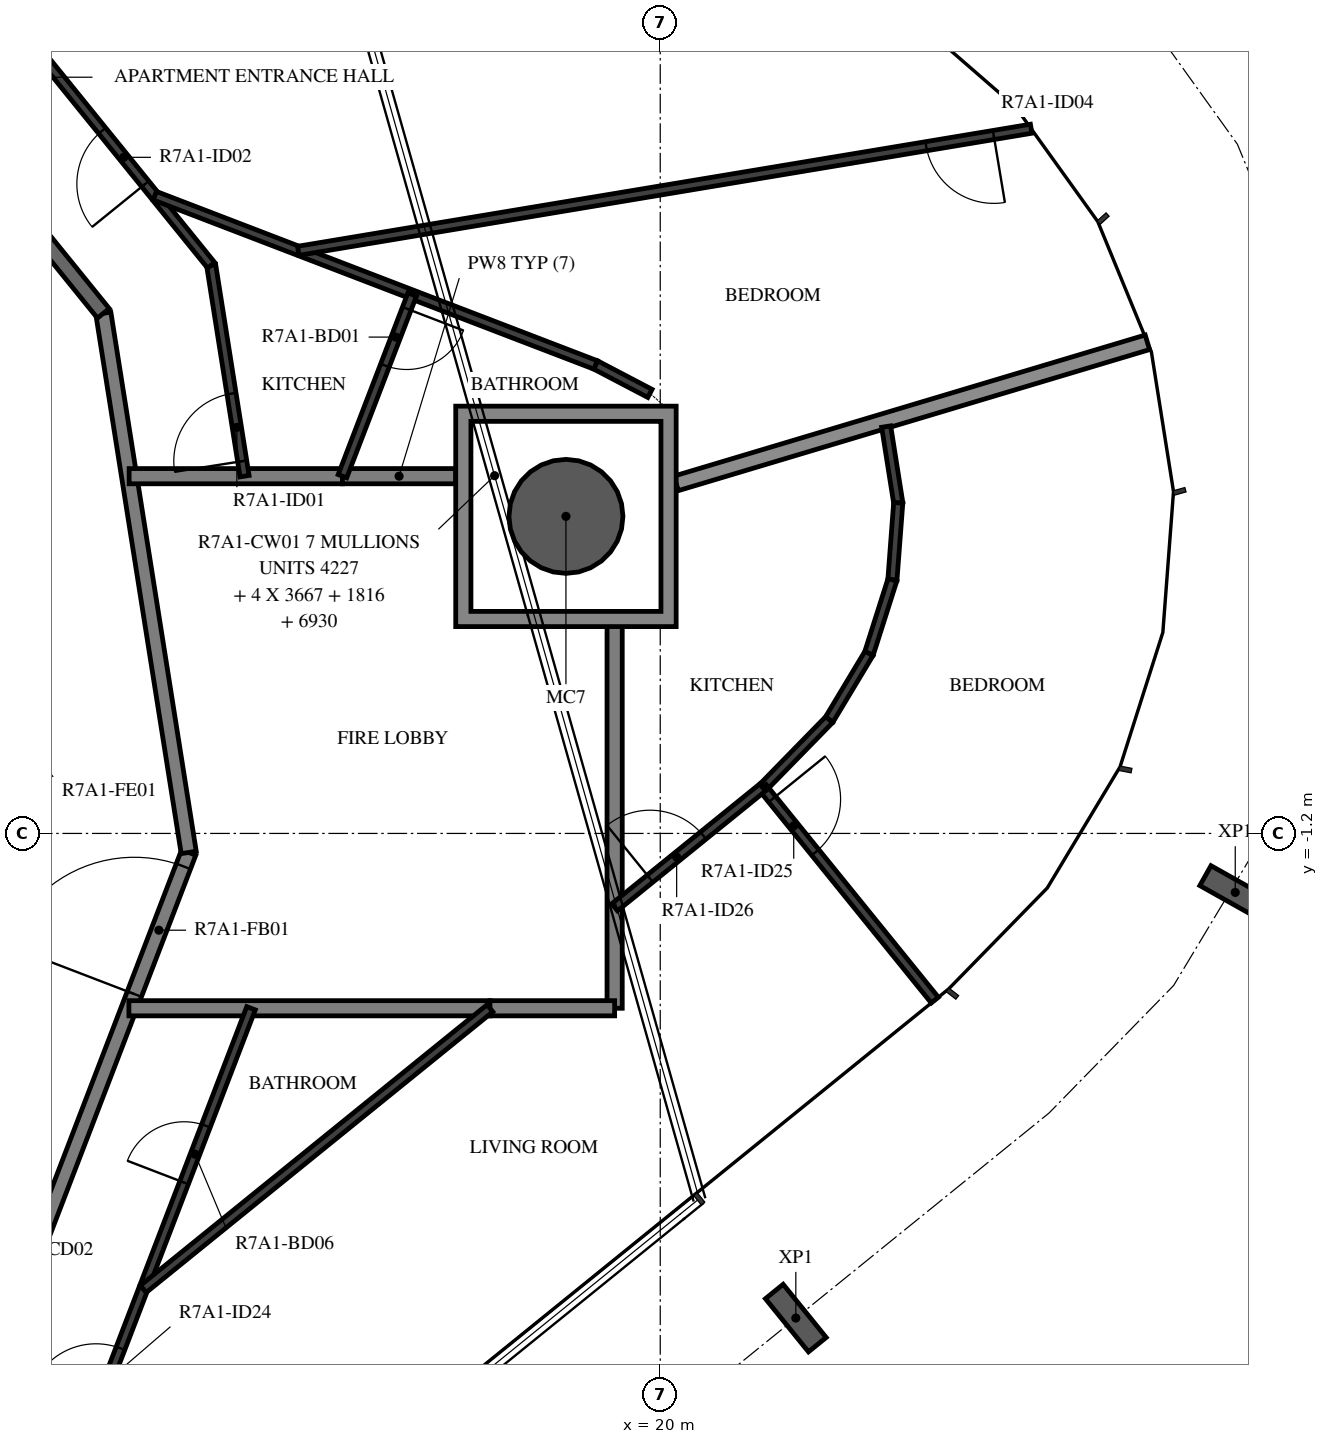
"""IFC4 building model, lengths in metres.
Left out: names, types, materials, properties, quantities, classifications, styles, units other than length and angle.
Written with IfcOpenShell. Run it as: python <this file> out.ifc"""

import sys

from ifc_helpers import new_model, si_unit, direction, frame, frame_2d, origin, origin_2d, place, context, subcontext, project, spatial, polyline, rectangle, hollow_circle, i_section, outline, extrude, element, fill, save


model = new_model("IFC4")
c1 = context("Model", 3, precision=1e-05, world=origin(), true_north=direction((0.0, 1.0)))
c2 = subcontext(c1, "Body", "Model", "MODEL_VIEW")
j1 = project(units=[si_unit("LENGTHUNIT", "METRE"), si_unit("PLANEANGLEUNIT", "RADIAN")], contexts=[c1])
p1 = place(None, origin())
s1 = spatial("IfcSite", under=j1, at=p1, CompositionType="ELEMENT")
p2 = place(p1, origin())
s2 = spatial("IfcBuilding", under=s1, at=p2, CompositionType="ELEMENT")
p3 = place(p2, frame((0.0, 0.0, 266.9)))
s3 = spatial("IfcBuildingStorey", under=s2, at=p3, CompositionType="ELEMENT", Elevation=266.9)
p4 = place(p3, frame((18.76, 2.971, -0.38), z_axis=(0.0, 0.0, 1.0), x_axis=(1.0, 0.0, 0.0)))
e1 = element("IfcColumn", 1, at=p4, inside=s3, PredefinedType="COLUMN", context=c2, shape_type="SweptSolid", body=[
    extrude(hollow_circle(Radius=0.75, WallThickness=0.035, at=origin_2d()), origin(), (0.0, 0.0, 1.0), 3.5),
])
for number, where, z_axis, x_axis in (
    (2, (21.784, -7.576, -0.38), (0.0, 0.0, 1.0), (-0.777, -0.629, 0.0)),
    (3, (27.565, -1.976, -0.38), (0.0, 0.0, 1.0), (-0.49, -0.872, 0.0)),
):
    element("IfcColumn", number, at=place(p3, frame(where, z_axis=z_axis, x_axis=x_axis)), inside=s3, PredefinedType="COLUMN", context=c2, shape_type="SweptSolid", body=[
        extrude(i_section(OverallWidth=0.3, OverallDepth=0.9, WebThickness=0.019, FlangeThickness=0.035, FilletRadius=0.03, at=origin_2d()), origin(), (0.0, 0.0, 1.0), 3.5),
    ])
p5 = place(p3, frame((11.223, -8.154, 0.0), z_axis=(0.0, 0.0, 1.0), x_axis=(0.358341090983, 0.93359073609, 0.0)))
e4 = element("IfcWall", 4, at=p5, inside=s3, PredefinedType="STANDARD", context=c2, shape_type="SweptSolid", body=[
    extrude(rectangle(XDim=7.181, YDim=0.2, at=frame_2d((3.59, 0.0))), origin(), (0.0, 0.0, 1.0), 3.12),
])
p6 = place(p5, frame((5.185, 0.0, 0.0)))
e5 = element("IfcOpeningElement", 5, at=p6, cuts=e4, PredefinedType="OPENING", context=c2, shape_type="SweptSolid", body=[
    extrude(rectangle(XDim=1.8, YDim=2.1, at=frame_2d((0.9, 1.05))), frame((0.0, 0.11, 0.0), z_axis=(0.0, -1.0, 0.0), x_axis=(1.0, 0.0, 0.0)), (0.0, 0.0, 1.0), 0.22),
])
p7 = place(p3, frame((13.797, -1.45, 0.0), z_axis=(0.0, 0.0, 1.0), x_axis=(-0.156421704315, 0.987690361611, 0.0)))
e6 = element("IfcWall", 6, at=p7, inside=s3, PredefinedType="STANDARD", context=c2, shape_type="SweptSolid", body=[
    extrude(rectangle(XDim=7.181, YDim=0.2, at=frame_2d((3.591, 0.0))), origin(), (0.0, 0.0, 1.0), 3.12),
])
p8 = place(p3, frame((12.673, 5.643, 0.0), z_axis=(0.0, 0.0, 1.0), x_axis=(-0.629302871585, 0.777160148113, 0.0)))
e7 = element("IfcWall", 7, at=p8, inside=s3, PredefinedType="STANDARD", context=c2, shape_type="SweptSolid", body=[
    extrude(rectangle(XDim=7.181, YDim=0.2, at=frame_2d((3.59, 0.0))), origin(), (0.0, 0.0, 1.0), 3.12),
])
p9 = place(p8, frame((4.1, 0.0, 0.0)))
e8 = element("IfcOpeningElement", 8, at=p9, cuts=e7, PredefinedType="OPENING", context=c2, shape_type="SweptSolid", body=[
    extrude(rectangle(XDim=1.0, YDim=2.1, at=frame_2d((0.5, 1.05))), frame((0.0, 0.11, 0.0), z_axis=(0.0, -1.0, 0.0), x_axis=(1.0, 0.0, 0.0)), (0.0, 0.0, 1.0), 0.22),
])
p10 = place(p3, frame((15.819, 3.5, 0.0), z_axis=(0.0, 0.0, 1.0), x_axis=(-1.0, 0.0, 0.0)))
e9 = element("IfcWall", 9, at=p10, inside=s3, PredefinedType="STANDARD", context=c2, shape_type="SweptSolid", body=[
    extrude(rectangle(XDim=2.806, YDim=0.2, at=frame_2d((1.403, 0.0))), origin(), (0.0, 0.0, 1.0), 3.12),
])
p11 = place(p3, frame((17.309, 3.5, 0.0), z_axis=(0.0, 0.0, 1.0), x_axis=(-1.0, 0.0, 0.0)))
e10 = element("IfcWall", 10, at=p11, inside=s3, PredefinedType="STANDARD", context=c2, shape_type="SweptSolid", body=[
    extrude(rectangle(XDim=1.49, YDim=0.2, at=frame_2d((0.745, 0.0))), origin(), (0.0, 0.0, 1.0), 3.12),
])
p12 = place(p3, frame((13.01, -3.5, 0.0), z_axis=(0.0, 0.0, 1.0), x_axis=(1.0, 0.0, 0.0)))
e11 = element("IfcWall", 11, at=p12, inside=s3, PredefinedType="STANDARD", context=c2, shape_type="SweptSolid", body=[
    extrude(rectangle(XDim=4.75, YDim=0.2, at=frame_2d((2.375, 0.0))), origin(), (0.0, 0.0, 1.0), 3.12),
])
p13 = place(p3, frame((19.4, -3.5, 0.0), z_axis=(0.0, 0.0, 1.0), x_axis=(0.0, 1.0, 0.0)))
e12 = element("IfcWall", 12, at=p13, inside=s3, PredefinedType="STANDARD", context=c2, shape_type="SweptSolid", body=[
    extrude(rectangle(XDim=5.021, YDim=0.2, at=frame_2d((2.511, 0.0))), origin(), (0.0, 0.0, 1.0), 3.12),
])
p14 = place(p3, frame((17.76, -3.5, 0.0), z_axis=(0.0, 0.0, 1.0), x_axis=(1.0, 0.0, 0.0)))
e13 = element("IfcWall", 13, at=p14, inside=s3, PredefinedType="STANDARD", context=c2, shape_type="SweptSolid", body=[
    extrude(rectangle(XDim=1.64, YDim=0.2, at=frame_2d((0.82, 0.0))), origin(), (0.0, 0.0, 1.0), 3.12),
])
p15 = place(p3, frame((20.209, 3.405, 0.0), z_axis=(0.0, 0.0, 1.0), x_axis=(0.957991224208, 0.286797514529, 0.0)))
e14 = element("IfcWall", 14, at=p15, inside=s3, PredefinedType="STANDARD", context=c2, shape_type="SweptSolid", body=[
    extrude(rectangle(XDim=6.471, YDim=0.2, at=frame_2d((3.236, 0.0))), origin(), (0.0, 0.0, 1.0), 2.73),
])
p16 = place(p3, frame((14.531, 3.5, 0.0), z_axis=(0.0, 0.0, 1.0), x_axis=(-0.1564580042, 0.987684612071, 0.0)))
e15 = element("IfcWall", 15, at=p16, inside=s3, PredefinedType="PARTITIONING", context=c2, shape_type="SweptSolid", body=[
    extrude(rectangle(XDim=2.809, YDim=0.12, at=frame_2d((1.404, 0.0))), origin(), (0.0, 0.0, 1.0), 3.12),
])
p17 = place(p16, frame((0.2, 0.0, 0.0)))
e16 = element("IfcOpeningElement", 16, at=p17, cuts=e15, PredefinedType="OPENING", context=c2, shape_type="SweptSolid", body=[
    extrude(rectangle(XDim=0.9, YDim=2.1, at=frame_2d((0.45, 1.05))), frame((0.0, 0.07, 0.0), z_axis=(0.0, -1.0, 0.0), x_axis=(1.0, 0.0, 0.0)), (0.0, 0.0, 1.0), 0.14),
])
p18 = place(p3, frame((14.092, 6.274, 0.0), z_axis=(0.0, 0.0, 1.0), x_axis=(-0.62933367237, 0.777135206268, 0.0)))
e17 = element("IfcWall", 17, at=p18, inside=s3, PredefinedType="PARTITIONING", context=c2, shape_type="SweptSolid", body=[
    extrude(rectangle(XDim=7.985, YDim=0.12, at=frame_2d((3.992, 0.0))), origin(), (0.0, 0.0, 1.0), 3.12),
])
p19 = place(p18, frame((1.378, 0.0, 0.0)))
e18 = element("IfcOpeningElement", 18, at=p19, cuts=e17, PredefinedType="OPENING", context=c2, shape_type="SweptSolid", body=[
    extrude(rectangle(XDim=0.9, YDim=2.1, at=frame_2d((0.45, 1.05))), frame((0.0, 0.07, 0.0), z_axis=(0.0, -1.0, 0.0), x_axis=(1.0, 0.0, 0.0)), (0.0, 0.0, 1.0), 0.14),
])
p20 = place(p18, frame((4.749, 0.0, 0.0)))
e19 = element("IfcOpeningElement", 19, at=p20, cuts=e17, PredefinedType="OPENING", context=c2, shape_type="SweptSolid", body=[
    extrude(rectangle(XDim=0.9, YDim=2.1, at=frame_2d((0.45, 1.05))), frame((0.0, 0.07, 0.0), z_axis=(0.0, -1.0, 0.0), x_axis=(1.0, 0.0, 0.0)), (0.0, 0.0, 1.0), 0.14),
])
p21 = place(p3, frame((19.865, 4.589, 0.0), z_axis=(0.0, 0.0, 1.0), x_axis=(-0.885855229108, 0.46396175819, 0.0)))
e20 = element("IfcWall", 20, at=p21, inside=s3, PredefinedType="PARTITIONING", context=c2, shape_type="SweptSolid", body=[
    extrude(rectangle(XDim=0.807, YDim=0.12, at=frame_2d((0.403, 0.0))), origin(), (0.0, 0.0, 1.0), 3.12),
])
p22 = place(p3, frame((19.15, 4.963, 0.0), z_axis=(0.0, 0.0, 1.0), x_axis=(-0.933571304602, 0.358391711992, 0.0)))
e21 = element("IfcWall", 21, at=p22, inside=s3, PredefinedType="PARTITIONING", context=c2, shape_type="SweptSolid", body=[
    extrude(rectangle(XDim=6.212, YDim=0.12, at=frame_2d((3.106, 0.0))), origin(), (0.0, 0.0, 1.0), 3.12),
])
p23 = place(p3, frame((16.737, 5.89, 0.0), z_axis=(0.0, 0.0, 1.0), x_axis=(-0.358397454141, -0.933569100209, 0.0)))
e22 = element("IfcWall", 22, at=p23, inside=s3, PredefinedType="PARTITIONING", context=c2, shape_type="SweptSolid", body=[
    extrude(rectangle(XDim=2.56, YDim=0.12, at=frame_2d((1.28, 0.0))), origin(), (0.0, 0.0, 1.0), 3.12),
])
p24 = place(p23, frame((0.2, 0.0, 0.0)))
e23 = element("IfcOpeningElement", 23, at=p24, cuts=e22, PredefinedType="OPENING", context=c2, shape_type="SweptSolid", body=[
    extrude(rectangle(XDim=0.8, YDim=2.1, at=frame_2d((0.4, 1.05))), frame((0.0, 0.07, 0.0), z_axis=(0.0, -1.0, 0.0), x_axis=(1.0, 0.0, 0.0)), (0.0, 0.0, 1.0), 0.14),
])
p25 = place(p3, frame((24.88, 8.071, 0.0), z_axis=(0.0, 0.0, 1.0), x_axis=(-0.986414168431, -0.164277473558, 0.0)))
e24 = element("IfcWall", 24, at=p25, inside=s3, PredefinedType="PARTITIONING", context=c2, shape_type="SweptSolid", body=[
    extrude(rectangle(XDim=9.774, YDim=0.12, at=frame_2d((4.887, 0.0))), origin(), (0.0, 0.0, 1.0), 3.12),
])
p26 = place(p25, frame((0.5, 0.0, 0.0)))
e25 = element("IfcOpeningElement", 25, at=p26, cuts=e24, PredefinedType="OPENING", context=c2, shape_type="SweptSolid", body=[
    extrude(rectangle(XDim=0.9, YDim=2.1, at=frame_2d((0.45, 1.05))), frame((0.0, 0.07, 0.0), z_axis=(0.0, -1.0, 0.0), x_axis=(1.0, 0.0, 0.0)), (0.0, 0.0, 1.0), 0.14),
])
p27 = place(p3, frame((12.505, -9.001, 0.0), z_axis=(0.0, 0.0, 1.0), x_axis=(0.358373707046, 0.933578216379, 0.0)))
e26 = element("IfcWall", 26, at=p27, inside=s3, PredefinedType="PARTITIONING", context=c2, shape_type="SweptSolid", body=[
    extrude(rectangle(XDim=5.892, YDim=0.12, at=frame_2d((2.946, 0.0))), origin(), (0.0, 0.0, 1.0), 3.12),
])
p28 = place(p27, frame((0.2, 0.0, 0.0)))
e27 = element("IfcOpeningElement", 27, at=p28, cuts=e26, PredefinedType="OPENING", context=c2, shape_type="SweptSolid", body=[
    extrude(rectangle(XDim=0.9, YDim=2.1, at=frame_2d((0.45, 1.05))), frame((0.0, 0.07, 0.0), z_axis=(0.0, -1.0, 0.0), x_axis=(1.0, 0.0, 0.0)), (0.0, 0.0, 1.0), 0.14),
])
p29 = place(p27, frame((3.436, 0.0, 0.0)))
e28 = element("IfcOpeningElement", 28, at=p29, cuts=e26, PredefinedType="OPENING", context=c2, shape_type="SweptSolid", body=[
    extrude(rectangle(XDim=0.8, YDim=2.1, at=frame_2d((0.4, 1.05))), frame((0.0, 0.07, 0.0), z_axis=(0.0, -1.0, 0.0), x_axis=(1.0, 0.0, 0.0)), (0.0, 0.0, 1.0), 0.14),
])
p30 = place(p3, frame((22.972, 4.153, 0.0), z_axis=(0.0, 0.0, 1.0), x_axis=(0.156209385929, -0.987723963336, 0.0)))
e29 = element("IfcWall", 29, at=p30, inside=s3, PredefinedType="PARTITIONING", context=c2, shape_type="SweptSolid", body=[
    extrude(rectangle(XDim=1.016, YDim=0.12, at=frame_2d((0.508, 0.0))), origin(), (0.0, 0.0, 1.0), 3.12),
])
p31 = place(p3, frame((23.131, 3.149, 0.0), z_axis=(0.0, 0.0, 1.0), x_axis=(-0.075446997935, -0.99714981347, 0.0)))
e30 = element("IfcWall", 30, at=p31, inside=s3, PredefinedType="PARTITIONING", context=c2, shape_type="SweptSolid", body=[
    extrude(rectangle(XDim=1.016, YDim=0.12, at=frame_2d((0.508, 0.0))), origin(), (0.0, 0.0, 1.0), 3.12),
])
p32 = place(p3, frame((23.054, 2.136, 0.0), z_axis=(0.0, 0.0, 1.0), x_axis=(-0.303511129679, -0.952827893253, 0.0)))
e31 = element("IfcWall", 31, at=p32, inside=s3, PredefinedType="PARTITIONING", context=c2, shape_type="SweptSolid", body=[
    extrude(rectangle(XDim=1.016, YDim=0.12, at=frame_2d((0.508, 0.0))), origin(), (0.0, 0.0, 1.0), 3.12),
])
p33 = place(p3, frame((22.746, 1.168, 0.0), z_axis=(0.0, 0.0, 1.0), x_axis=(-0.515096534995, -0.857132171626, 0.0)))
e32 = element("IfcWall", 32, at=p33, inside=s3, PredefinedType="PARTITIONING", context=c2, shape_type="SweptSolid", body=[
    extrude(rectangle(XDim=1.016, YDim=0.12, at=frame_2d((0.508, 0.0))), origin(), (0.0, 0.0, 1.0), 3.12),
])
p34 = place(p3, frame((22.223, 0.298, 0.0), z_axis=(0.0, 0.0, 1.0), x_axis=(-0.69880109182, -0.715316037896, 0.0)))
e33 = element("IfcWall", 33, at=p34, inside=s3, PredefinedType="PARTITIONING", context=c2, shape_type="SweptSolid", body=[
    extrude(rectangle(XDim=1.227, YDim=0.12, at=frame_2d((0.614, 0.0))), origin(), (0.0, 0.0, 1.0), 3.12),
])
p35 = place(p3, frame((21.347, -0.595, 0.0), z_axis=(0.0, 0.0, 1.0), x_axis=(0.62934843781, -0.7771232488, 0.0)))
e34 = element("IfcWall", 34, at=p35, inside=s3, PredefinedType="PARTITIONING", context=c2, shape_type="SweptSolid", body=[
    extrude(rectangle(XDim=3.6, YDim=0.12, at=frame_2d((1.8, 0.0))), origin(), (0.0, 0.0, 1.0), 3.12),
])
p36 = place(p35, frame((0.2, 0.0, 0.0)))
e35 = element("IfcOpeningElement", 35, at=p36, cuts=e34, PredefinedType="OPENING", context=c2, shape_type="SweptSolid", body=[
    extrude(rectangle(XDim=0.9, YDim=2.1, at=frame_2d((0.45, 1.05))), frame((0.0, 0.07, 0.0), z_axis=(0.0, -1.0, 0.0), x_axis=(1.0, 0.0, 0.0)), (0.0, 0.0, 1.0), 0.14),
])
p37 = place(p3, frame((19.4, -2.172, 0.0), z_axis=(0.0, 0.0, 1.0), x_axis=(0.777147279935, 0.629318762862, 0.0)))
e36 = element("IfcWall", 36, at=p37, inside=s3, PredefinedType="PARTITIONING", context=c2, shape_type="SweptSolid", body=[
    extrude(rectangle(XDim=2.505, YDim=0.12, at=frame_2d((1.253, 0.0))), origin(), (0.0, 0.0, 1.0), 3.12),
])
p38 = place(p37, frame((0.6, 0.0, 0.0)))
e37 = element("IfcOpeningElement", 37, at=p38, cuts=e36, PredefinedType="OPENING", context=c2, shape_type="SweptSolid", body=[
    extrude(rectangle(XDim=0.9, YDim=2.1, at=frame_2d((0.45, 1.05))), frame((0.0, 0.07, 0.0), z_axis=(0.0, -1.0, 0.0), x_axis=(1.0, 0.0, 0.0)), (0.0, 0.0, 1.0), 0.14),
])
p39 = place(p3, frame((17.76, -3.5, 0.0), z_axis=(0.0, 0.0, 1.0), x_axis=(-0.777133455716, -0.62933583404, 0.0)))
e38 = element("IfcWall", 38, at=p39, inside=s3, PredefinedType="PARTITIONING", context=c2, shape_type="SweptSolid", body=[
    extrude(rectangle(XDim=5.869, YDim=0.12, at=frame_2d((2.935, 0.0))), origin(), (0.0, 0.0, 1.0), 3.12),
])
p40 = place(p3, origin())
e39 = element("IfcWall", 39, at=p40, inside=s3, PredefinedType="STANDARD", context=c2, shape_type="SweptSolid", body=[
    extrude(outline(polyline([(20.209, 4.421), (20.209, 1.521), (17.309, 1.521), (17.309, 4.421), (20.209, 4.421)]), holes=[polyline([(17.51, 1.721), (20.01, 1.721), (20.01, 4.221), (17.51, 4.221), (17.51, 1.721)])]), origin(), (0.0, 0.0, 1.0), 3.12),
])
p41 = place(p17, origin())
e40 = element("IfcDoor", 40, at=p41, inside=s3, OperationType="SINGLE_SWING_LEFT", PredefinedType="DOOR", context=c2, shape_type="SweptSolid", body=[
    extrude(rectangle(XDim=0.9, YDim=2.1, at=frame_2d((0.45, 1.05))), frame((0.0, 0.025, 0.0), z_axis=(0.0, -1.0, 0.0), x_axis=(1.0, 0.0, 0.0)), (0.0, 0.0, 1.0), 0.05),
])
fill(e16, e40)
p42 = place(p19, origin())
e41 = element("IfcDoor", 41, at=p42, inside=s3, OperationType="SINGLE_SWING_LEFT", PredefinedType="DOOR", context=c2, shape_type="SweptSolid", body=[
    extrude(rectangle(XDim=0.9, YDim=2.1, at=frame_2d((0.45, 1.05))), frame((0.0, 0.025, 0.0), z_axis=(0.0, -1.0, 0.0), x_axis=(1.0, 0.0, 0.0)), (0.0, 0.0, 1.0), 0.05),
])
fill(e18, e41)
p43 = place(p24, origin())
e42 = element("IfcDoor", 42, at=p43, inside=s3, OperationType="SINGLE_SWING_LEFT", PredefinedType="DOOR", context=c2, shape_type="SweptSolid", body=[
    extrude(rectangle(XDim=0.8, YDim=2.1, at=frame_2d((0.4, 1.05))), frame((0.0, 0.025, 0.0), z_axis=(0.0, -1.0, 0.0), x_axis=(1.0, 0.0, 0.0)), (0.0, 0.0, 1.0), 0.05),
])
fill(e23, e42)
p44 = place(p26, origin())
e43 = element("IfcDoor", 43, at=p44, inside=s3, OperationType="SINGLE_SWING_LEFT", PredefinedType="DOOR", context=c2, shape_type="SweptSolid", body=[
    extrude(rectangle(XDim=0.9, YDim=2.1, at=frame_2d((0.45, 1.05))), frame((0.0, 0.025, 0.0), z_axis=(0.0, -1.0, 0.0), x_axis=(1.0, 0.0, 0.0)), (0.0, 0.0, 1.0), 0.05),
])
fill(e25, e43)
p45 = place(p28, origin())
e44 = element("IfcDoor", 44, at=p45, inside=s3, OperationType="SINGLE_SWING_RIGHT", PredefinedType="DOOR", context=c2, shape_type="SweptSolid", body=[
    extrude(rectangle(XDim=0.9, YDim=2.1, at=frame_2d((0.45, 1.05))), frame((0.0, 0.025, 0.0), z_axis=(0.0, -1.0, 0.0), x_axis=(1.0, 0.0, 0.0)), (0.0, 0.0, 1.0), 0.05),
])
fill(e27, e44)
p46 = place(p29, origin())
e45 = element("IfcDoor", 45, at=p46, inside=s3, OperationType="SINGLE_SWING_RIGHT", PredefinedType="DOOR", context=c2, shape_type="SweptSolid", body=[
    extrude(rectangle(XDim=0.8, YDim=2.1, at=frame_2d((0.4, 1.05))), frame((0.0, 0.025, 0.0), z_axis=(0.0, -1.0, 0.0), x_axis=(1.0, 0.0, 0.0)), (0.0, 0.0, 1.0), 0.05),
])
fill(e28, e45)
p47 = place(p36, origin())
e46 = element("IfcDoor", 46, at=p47, inside=s3, OperationType="SINGLE_SWING_RIGHT", PredefinedType="DOOR", context=c2, shape_type="SweptSolid", body=[
    extrude(rectangle(XDim=0.9, YDim=2.1, at=frame_2d((0.45, 1.05))), frame((0.0, 0.025, 0.0), z_axis=(0.0, -1.0, 0.0), x_axis=(1.0, 0.0, 0.0)), (0.0, 0.0, 1.0), 0.05),
])
fill(e35, e46)
p48 = place(p38, origin())
e47 = element("IfcDoor", 47, at=p48, inside=s3, OperationType="SINGLE_SWING_LEFT", PredefinedType="DOOR", context=c2, shape_type="SweptSolid", body=[
    extrude(rectangle(XDim=0.9, YDim=2.1, at=frame_2d((0.45, 1.05))), frame((0.0, 0.025, 0.0), z_axis=(0.0, -1.0, 0.0), x_axis=(1.0, 0.0, 0.0)), (0.0, 0.0, 1.0), 0.05),
])
fill(e37, e47)
p49 = place(p6, origin())
e48 = element("IfcDoor", 48, at=p49, inside=s3, OperationType="DOUBLE_DOOR_SINGLE_SWING", PredefinedType="DOOR", context=c2, shape_type="SweptSolid", body=[
    extrude(rectangle(XDim=1.8, YDim=2.1, at=frame_2d((0.9, 1.05))), frame((0.0, 0.025, 0.0), z_axis=(0.0, -1.0, 0.0), x_axis=(1.0, 0.0, 0.0)), (0.0, 0.0, 1.0), 0.05),
])
fill(e5, e48)
save(model, sys.argv[1])
